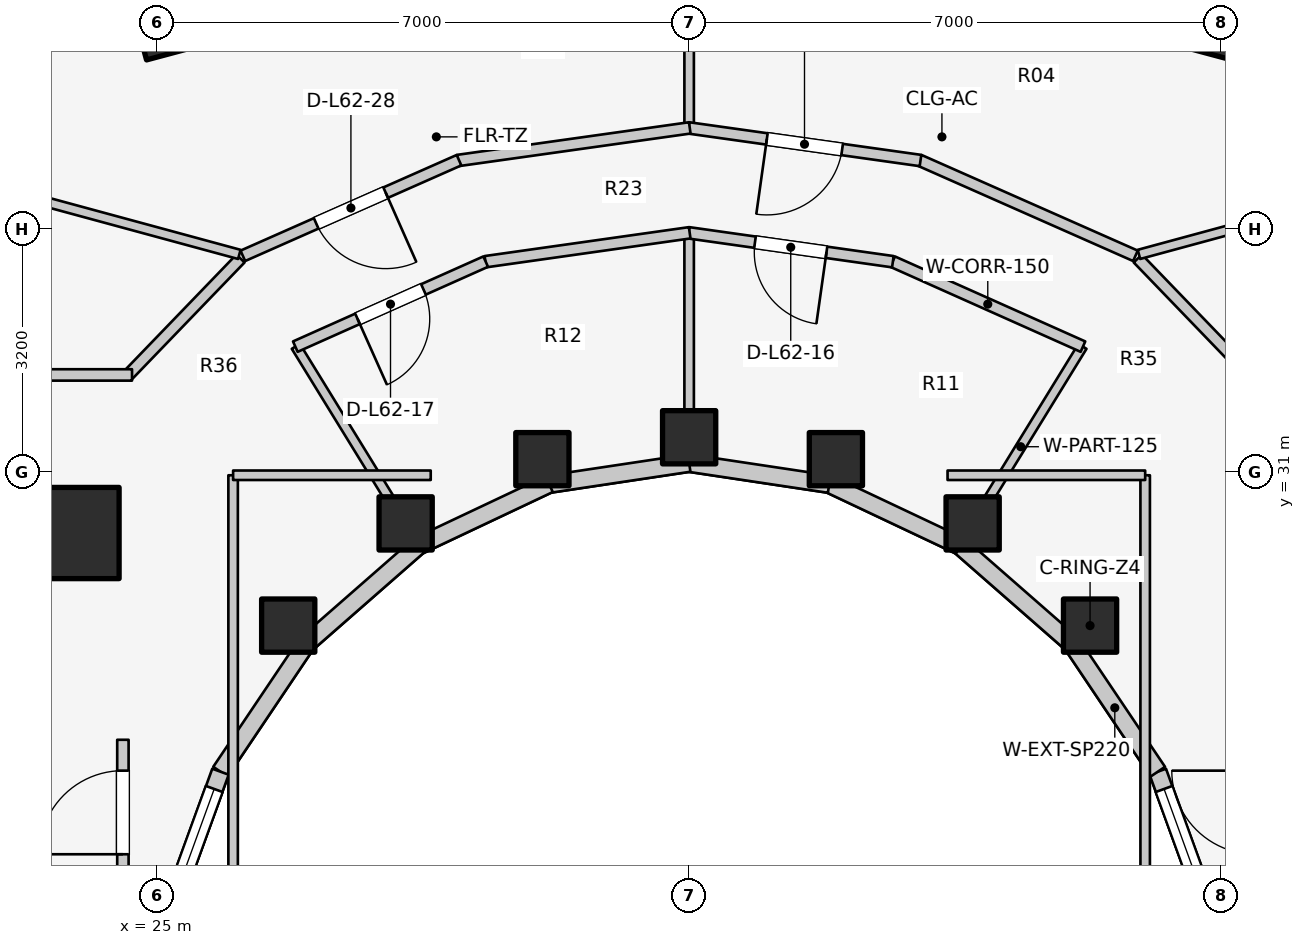
"""IFC4 building model, lengths in metres.
Left out: names, types, materials, properties, quantities, classifications, styles, units other than length and angle.
Written with IfcOpenShell. Run it as: python <this file> out.ifc"""

import sys

from ifc_helpers import new_model, si_unit, direction, frame, frame_2d, origin, origin_2d, place, context, subcontext, project, spatial, rectangle, extrude, element, fill, save


model = new_model("IFC4")
c1 = context("Model", 3, precision=1e-05, world=origin(), true_north=direction((0.0, 1.0)))
c2 = subcontext(c1, "Body", "Model", "MODEL_VIEW")
j1 = project(units=[si_unit("LENGTHUNIT", "METRE"), si_unit("PLANEANGLEUNIT", "RADIAN")], contexts=[c1])
p1 = place(None, origin())
s1 = spatial("IfcSite", under=j1, at=p1, CompositionType="ELEMENT")
p2 = place(p1, origin())
s2 = spatial("IfcBuilding", under=s1, at=p2, CompositionType="ELEMENT")
p3 = place(p2, frame((0.0, 0.0, 204.7)))
s3 = spatial("IfcBuildingStorey", under=s2, at=p3, CompositionType="ELEMENT", Elevation=204.7)
p4 = place(p3, frame((19.65, 30.35, 0.0), z_axis=(0.0, 0.0, 1.0), x_axis=(1.0, 0.0, 0.0)))
e1 = element("IfcWall", 1, at=p4, inside=s3, PredefinedType="SHEAR", context=c2, shape_type="SweptSolid", body=[
    extrude(rectangle(XDim=4.5, YDim=0.55, at=frame_2d((2.25, 0.0))), origin(), (0.0, 0.0, 1.0), 3.1),
])
p5 = place(p3, frame((23.9, 30.2, 0.0), z_axis=(0.0, 0.0, 1.0), x_axis=(1.0, 0.0, 0.0)))
e2 = element("IfcColumn", 2, at=p5, inside=s3, PredefinedType="COLUMN", context=c2, shape_type="SweptSolid", body=[
    extrude(rectangle(XDim=1.2, YDim=1.2, at=origin_2d()), origin(), (0.0, 0.0, 1.0), 3.1),
])
for number, where, z_axis, x_axis in (
    (3, (37.275, 28.982, 0.0), (0.0, 0.0, 1.0), (1.0, 0.0, 0.0)),
    (4, (35.73, 30.327, 0.0), (0.0, 0.0, 1.0), (1.0, 0.0, 0.0)),
    (5, (33.931, 31.172, 0.0), (0.0, 0.0, 1.0), (1.0, 0.0, 0.0)),
):
    element("IfcColumn", number, at=place(p3, frame(where, z_axis=z_axis, x_axis=x_axis)), inside=s3, PredefinedType="COLUMN", context=c2, shape_type="SweptSolid", body=[
        extrude(rectangle(XDim=0.7, YDim=0.7, at=origin_2d()), origin(), (0.0, 0.0, 1.0), 3.1),
    ])
p6 = place(p3, frame((38.856, 36.914, 0.0), z_axis=(0.0, 0.0, 1.0), x_axis=(0.258819045103, 0.965925826289, 0.0)))
e6 = element("IfcColumn", 6, at=p6, inside=s3, PredefinedType="COLUMN", context=c2, shape_type="SweptSolid", body=[
    extrude(rectangle(XDim=0.8, YDim=0.8, at=origin_2d()), origin(), (0.0, 0.0, 1.0), 3.1),
])
for number, where, z_axis, x_axis in (
    (7, (32.0, 31.46, 0.0), (0.0, 0.0, 1.0), (1.0, 0.0, 0.0)),
    (8, (30.069, 31.172, 0.0), (0.0, 0.0, 1.0), (1.0, 0.0, 0.0)),
):
    element("IfcColumn", number, at=place(p3, frame(where, z_axis=z_axis, x_axis=x_axis)), inside=s3, PredefinedType="COLUMN", context=c2, shape_type="SweptSolid", body=[
        extrude(rectangle(XDim=0.7, YDim=0.7, at=origin_2d()), origin(), (0.0, 0.0, 1.0), 3.1),
    ])
p7 = place(p3, frame((25.144, 36.914, 0.0), z_axis=(0.0, 0.0, 1.0), x_axis=(-0.258819045103, 0.965925826289, 0.0)))
e9 = element("IfcColumn", 9, at=p7, inside=s3, PredefinedType="COLUMN", context=c2, shape_type="SweptSolid", body=[
    extrude(rectangle(XDim=0.8, YDim=0.8, at=origin_2d()), origin(), (0.0, 0.0, 1.0), 3.1),
])
for number, where, z_axis, x_axis in (
    (10, (28.27, 30.327, 0.0), (0.0, 0.0, 1.0), (1.0, 0.0, 0.0)),
    (11, (26.725, 28.982, 0.0), (0.0, 0.0, 1.0), (1.0, 0.0, 0.0)),
):
    element("IfcColumn", number, at=place(p3, frame(where, z_axis=z_axis, x_axis=x_axis)), inside=s3, PredefinedType="COLUMN", context=c2, shape_type="SweptSolid", body=[
        extrude(rectangle(XDim=0.7, YDim=0.7, at=origin_2d()), origin(), (0.0, 0.0, 1.0), 3.1),
    ])
p8 = place(p3, frame((38.877, 25.102, 0.0), z_axis=(0.0, 0.0, 1.0), x_axis=(-0.341423187295, 0.93990968033, 0.0)))
e12 = element("IfcWall", 12, at=p8, inside=s3, PredefinedType="STANDARD", context=c2, shape_type="SweptSolid", body=[
    extrude(rectangle(XDim=2.084, YDim=0.23, at=frame_2d((1.042, 0.0))), origin(), (0.0, 0.0, 1.0), 2.84),
])
p9 = place(p8, frame((0.242, 0.0, 0.85)))
e13 = element("IfcOpeningElement", 13, at=p9, cuts=e12, PredefinedType="OPENING", context=c2, shape_type="SweptSolid", body=[
    extrude(rectangle(XDim=1.6, YDim=1.65, at=frame_2d((0.8, 0.825))), frame((0.0, 0.125, 0.0), z_axis=(0.0, -1.0, 0.0), x_axis=(1.0, 0.0, 0.0)), (0.0, 0.0, 1.0), 0.25),
])
p10 = place(p3, frame((38.166, 27.06, 0.0), z_axis=(0.0, 0.0, 1.0), x_axis=(-0.558197800898, 0.829707909492, 0.0)))
e14 = element("IfcWall", 14, at=p10, inside=s3, PredefinedType="STANDARD", context=c2, shape_type="SweptSolid", body=[
    extrude(rectangle(XDim=2.027, YDim=0.23, at=frame_2d((1.013, 0.0))), origin(), (0.0, 0.0, 1.0), 2.16),
])
p11 = place(p3, frame((37.035, 28.742, 0.0), z_axis=(0.0, 0.0, 1.0), x_axis=(-0.752576694707, 0.658504607869, 0.0)))
e15 = element("IfcWall", 15, at=p11, inside=s3, PredefinedType="STANDARD", context=c2, shape_type="SweptSolid", body=[
    extrude(rectangle(XDim=1.959, YDim=0.23, at=frame_2d((0.98, 0.0))), origin(), (0.0, 0.0, 1.0), 2.16),
])
p12 = place(p3, frame((35.56, 30.032, 0.0), z_axis=(0.0, 0.0, 1.0), x_axis=(-0.904179699603, 0.427152280606, 0.0)))
e16 = element("IfcWall", 16, at=p12, inside=s3, PredefinedType="STANDARD", context=c2, shape_type="SweptSolid", body=[
    extrude(rectangle(XDim=1.899, YDim=0.23, at=frame_2d((0.95, 0.0))), origin(), (0.0, 0.0, 1.0), 2.16),
])
for number, where, z_axis, x_axis in (
    (17, (33.843, 30.843, 0.0), (0.0, 0.0, 1.0), (-0.989, 0.149, 0.0)),
    (18, (32.0, 31.12, 0.0), (0.0, 0.0, 1.0), (-0.989, -0.149, 0.0)),
):
    element("IfcWall", number, at=place(p3, frame(where, z_axis=z_axis, x_axis=x_axis)), inside=s3, PredefinedType="STANDARD", context=c2, shape_type="SweptSolid", body=[
        extrude(rectangle(XDim=1.864, YDim=0.23, at=frame_2d((0.932, 0.0))), origin(), (0.0, 0.0, 1.0), 2.16),
    ])
p13 = place(p3, frame((30.157, 30.843, 0.0), z_axis=(0.0, 0.0, 1.0), x_axis=(-0.904179699603, -0.427152280606, 0.0)))
e19 = element("IfcWall", 19, at=p13, inside=s3, PredefinedType="STANDARD", context=c2, shape_type="SweptSolid", body=[
    extrude(rectangle(XDim=1.899, YDim=0.23, at=frame_2d((0.95, 0.0))), origin(), (0.0, 0.0, 1.0), 2.16),
])
p14 = place(p3, frame((28.44, 30.032, 0.0), z_axis=(0.0, 0.0, 1.0), x_axis=(-0.752576694707, -0.658504607869, 0.0)))
e20 = element("IfcWall", 20, at=p14, inside=s3, PredefinedType="STANDARD", context=c2, shape_type="SweptSolid", body=[
    extrude(rectangle(XDim=1.959, YDim=0.23, at=frame_2d((0.98, 0.0))), origin(), (0.0, 0.0, 1.0), 2.16),
])
p15 = place(p3, frame((26.965, 28.742, 0.0), z_axis=(0.0, 0.0, 1.0), x_axis=(-0.558197800898, -0.829707909492, 0.0)))
e21 = element("IfcWall", 21, at=p15, inside=s3, PredefinedType="STANDARD", context=c2, shape_type="SweptSolid", body=[
    extrude(rectangle(XDim=2.027, YDim=0.23, at=frame_2d((1.013, 0.0))), origin(), (0.0, 0.0, 1.0), 2.16),
])
p16 = place(p3, frame((25.834, 27.06, 0.0), z_axis=(0.0, 0.0, 1.0), x_axis=(-0.341423187295, -0.93990968033, 0.0)))
e22 = element("IfcWall", 22, at=p16, inside=s3, PredefinedType="STANDARD", context=c2, shape_type="SweptSolid", body=[
    extrude(rectangle(XDim=2.084, YDim=0.23, at=frame_2d((1.042, 0.0))), origin(), (0.0, 0.0, 1.0), 2.84),
])
p17 = place(p16, frame((0.242, 0.0, 0.85)))
e23 = element("IfcOpeningElement", 23, at=p17, cuts=e22, PredefinedType="OPENING", context=c2, shape_type="SweptSolid", body=[
    extrude(rectangle(XDim=1.6, YDim=1.65, at=frame_2d((0.8, 0.825))), frame((0.0, 0.125, 0.0), z_axis=(0.0, -1.0, 0.0), x_axis=(1.0, 0.0, 0.0)), (0.0, 0.0, 1.0), 0.25),
])
p18 = place(p3, frame((43.87, 36.177, 0.0), z_axis=(0.0, 0.0, 1.0), x_axis=(-0.965213026382, 0.261464746576, 0.0)))
e24 = element("IfcWall", 24, at=p18, inside=s3, PredefinedType="STANDARD", context=c2, shape_type="SweptSolid", body=[
    extrude(rectangle(XDim=5.001, YDim=0.26, at=frame_2d((2.5, 0.0))), origin(), (0.0, 0.0, 1.0), 2.88),
])
p19 = place(p18, frame((1.9, 0.0, 0.0)))
e25 = element("IfcOpeningElement", 25, at=p19, cuts=e24, PredefinedType="OPENING", context=c2, shape_type="SweptSolid", body=[
    extrude(rectangle(XDim=1.2, YDim=2.2, at=frame_2d((0.6, 1.1))), frame((0.0, 0.14, 0.0), z_axis=(0.0, -1.0, 0.0), x_axis=(1.0, 0.0, 0.0)), (0.0, 0.0, 1.0), 0.28),
])
p20 = place(p3, frame((24.957, 37.485, 0.0), z_axis=(0.0, 0.0, 1.0), x_axis=(-0.965213026382, -0.261464746576, 0.0)))
e26 = element("IfcWall", 26, at=p20, inside=s3, PredefinedType="STANDARD", context=c2, shape_type="SweptSolid", body=[
    extrude(rectangle(XDim=5.001, YDim=0.26, at=frame_2d((2.5, 0.0))), origin(), (0.0, 0.0, 1.0), 2.88),
])
p21 = place(p20, frame((1.9, 0.0, 0.0)))
e27 = element("IfcOpeningElement", 27, at=p21, cuts=e26, PredefinedType="OPENING", context=c2, shape_type="SweptSolid", body=[
    extrude(rectangle(XDim=1.2, YDim=2.2, at=frame_2d((0.6, 1.1))), frame((0.0, 0.14, 0.0), z_axis=(0.0, -1.0, 0.0), x_axis=(1.0, 0.0, 0.0)), (0.0, 0.0, 1.0), 0.28),
])
p22 = place(p3, frame((24.55, 24.08, 0.0), z_axis=(0.0, 0.0, 1.0), x_axis=(0.0, 1.0, 0.0)))
e28 = element("IfcWall", 28, at=p22, inside=s3, PredefinedType="PARTITIONING", context=c2, shape_type="SweptSolid", body=[
    extrude(rectangle(XDim=3.4, YDim=0.15, at=frame_2d((1.7, 0.0))), origin(), (0.0, 0.0, 1.0), 2.855),
])
p23 = place(p22, frame((1.894, 0.0, 0.0)))
e29 = element("IfcOpeningElement", 29, at=p23, cuts=e28, PredefinedType="OPENING", context=c2, shape_type="SweptSolid", body=[
    extrude(rectangle(XDim=1.1, YDim=2.1, at=frame_2d((0.55, 1.05))), frame((0.0, 0.085, 0.0), z_axis=(0.0, -1.0, 0.0), x_axis=(1.0, 0.0, 0.0)), (0.0, 0.0, 1.0), 0.17),
])
p24 = place(p3, frame((35.55, 30.015, 0.0), z_axis=(0.0, 0.0, 1.0), x_axis=(0.523992004803, 0.851723182086, 0.0)))
e30 = element("IfcWall", 30, at=p24, inside=s3, PredefinedType="PARTITIONING", context=c2, shape_type="SweptSolid", body=[
    extrude(rectangle(XDim=3.101, YDim=0.125, at=frame_2d((1.551, 0.0))), origin(), (0.0, 0.0, 1.0), 2.376),
])
p25 = place(p3, frame((32.0, 31.1, 0.0), z_axis=(0.0, 0.0, 1.0), x_axis=(0.0, 1.0, 0.0)))
e31 = element("IfcWall", 31, at=p25, inside=s3, PredefinedType="PARTITIONING", context=c2, shape_type="SweptSolid", body=[
    extrude(rectangle(XDim=3.05, YDim=0.125, at=frame_2d((1.525, 0.0))), origin(), (0.0, 0.0, 1.0), 2.376),
])
p26 = place(p3, frame((28.45, 30.015, 0.0), z_axis=(0.0, 0.0, 1.0), x_axis=(-0.523992004803, 0.851723182086, 0.0)))
e32 = element("IfcWall", 32, at=p26, inside=s3, PredefinedType="PARTITIONING", context=c2, shape_type="SweptSolid", body=[
    extrude(rectangle(XDim=3.101, YDim=0.125, at=frame_2d((1.551, 0.0))), origin(), (0.0, 0.0, 1.0), 2.376),
])
p27 = place(p3, frame((37.181, 32.652, 0.0), z_axis=(0.0, 0.0, 1.0), x_axis=(-0.913120130558, 0.407690602257, 0.0)))
e33 = element("IfcWall", 33, at=p27, inside=s3, PredefinedType="PARTITIONING", context=c2, shape_type="SweptSolid", body=[
    extrude(rectangle(XDim=2.743, YDim=0.15, at=frame_2d((1.371, 0.0))), origin(), (0.0, 0.0, 1.0), 2.376),
])
p28 = place(p3, frame((34.68, 33.77, 0.0), z_axis=(0.0, 0.0, 1.0), x_axis=(-0.990132151456, 0.140136799779, 0.0)))
e34 = element("IfcWall", 34, at=p28, inside=s3, PredefinedType="PARTITIONING", context=c2, shape_type="SweptSolid", body=[
    extrude(rectangle(XDim=2.714, YDim=0.15, at=frame_2d((1.357, 0.0))), origin(), (0.0, 0.0, 1.0), 2.376),
])
p29 = place(p28, frame((0.882, 0.0, 0.0)))
e35 = element("IfcOpeningElement", 35, at=p29, cuts=e34, PredefinedType="OPENING", context=c2, shape_type="SweptSolid", body=[
    extrude(rectangle(XDim=0.95, YDim=2.1, at=frame_2d((0.475, 1.05))), frame((0.0, 0.085, 0.0), z_axis=(0.0, -1.0, 0.0), x_axis=(1.0, 0.0, 0.0)), (0.0, 0.0, 1.0), 0.17),
])
p30 = place(p3, frame((32.007, 34.15, 0.0), z_axis=(0.0, 0.0, 1.0), x_axis=(-0.990132151456, -0.140136799779, 0.0)))
e36 = element("IfcWall", 36, at=p30, inside=s3, PredefinedType="PARTITIONING", context=c2, shape_type="SweptSolid", body=[
    extrude(rectangle(XDim=2.714, YDim=0.15, at=frame_2d((1.357, 0.0))), origin(), (0.0, 0.0, 1.0), 2.376),
])
p31 = place(p3, frame((29.323, 33.771, 0.0), z_axis=(0.0, 0.0, 1.0), x_axis=(-0.913120130558, -0.407690602257, 0.0)))
e37 = element("IfcWall", 37, at=p31, inside=s3, PredefinedType="PARTITIONING", context=c2, shape_type="SweptSolid", body=[
    extrude(rectangle(XDim=2.743, YDim=0.15, at=frame_2d((1.371, 0.0))), origin(), (0.0, 0.0, 1.0), 2.376),
])
p32 = place(p31, frame((0.896, 0.0, 0.0)))
e38 = element("IfcOpeningElement", 38, at=p32, cuts=e37, PredefinedType="OPENING", context=c2, shape_type="SweptSolid", body=[
    extrude(rectangle(XDim=0.95, YDim=2.1, at=frame_2d((0.475, 1.05))), frame((0.0, 0.085, 0.0), z_axis=(0.0, -1.0, 0.0), x_axis=(1.0, 0.0, 0.0)), (0.0, 0.0, 1.0), 0.17),
])
p33 = place(p3, frame((26.0, 25.8, 0.0), z_axis=(0.0, 0.0, 1.0), x_axis=(0.0, 1.0, 0.0)))
e39 = element("IfcWall", 39, at=p33, inside=s3, PredefinedType="PARTITIONING", context=c2, shape_type="SweptSolid", body=[
    extrude(rectangle(XDim=5.16, YDim=0.125, at=frame_2d((2.58, 0.0))), origin(), (0.0, 0.0, 1.0), 2.232),
])
p34 = place(p3, frame((26.0, 30.96, 0.0), z_axis=(0.0, 0.0, 1.0), x_axis=(1.0, 0.0, 0.0)))
e40 = element("IfcWall", 40, at=p34, inside=s3, PredefinedType="PARTITIONING", context=c2, shape_type="SweptSolid", body=[
    extrude(rectangle(XDim=2.6, YDim=0.125, at=frame_2d((1.3, 0.0))), origin(), (0.0, 0.0, 1.0), 2.376),
])
p35 = place(p3, frame((38.0, 25.8, 0.0), z_axis=(0.0, 0.0, 1.0), x_axis=(0.0, 1.0, 0.0)))
e41 = element("IfcWall", 41, at=p35, inside=s3, PredefinedType="PARTITIONING", context=c2, shape_type="SweptSolid", body=[
    extrude(rectangle(XDim=5.16, YDim=0.125, at=frame_2d((2.58, 0.0))), origin(), (0.0, 0.0, 1.0), 2.232),
])
p36 = place(p3, frame((35.4, 30.96, 0.0), z_axis=(0.0, 0.0, 1.0), x_axis=(1.0, 0.0, 0.0)))
e42 = element("IfcWall", 42, at=p36, inside=s3, PredefinedType="PARTITIONING", context=c2, shape_type="SweptSolid", body=[
    extrude(rectangle(XDim=2.6, YDim=0.125, at=frame_2d((1.3, 0.0))), origin(), (0.0, 0.0, 1.0), 2.376),
])
for number, where, z_axis, x_axis in (
    (43, (37.903, 33.812, 0.0), (0.0, 0.0, 1.0), (0.694, -0.72, 0.0)),
    (44, (26.097, 33.812, 0.0), (0.0, 0.0, 1.0), (-0.694, -0.72, 0.0)),
):
    element("IfcWall", number, at=place(p3, frame(where, z_axis=z_axis, x_axis=x_axis)), inside=s3, PredefinedType="PARTITIONING", context=c2, shape_type="SweptSolid", body=[
        extrude(rectangle(XDim=2.158, YDim=0.15, at=frame_2d((1.079, 0.0))), origin(), (0.0, 0.0, 1.0), 2.376),
    ])
p37 = place(p3, frame((17.15, 32.28, 0.0), z_axis=(0.0, 0.0, 1.0), x_axis=(1.0, 0.0, 0.0)))
e45 = element("IfcWall", 45, at=p37, inside=s3, PredefinedType="PARTITIONING", context=c2, shape_type="SweptSolid", body=[
    extrude(rectangle(XDim=7.52, YDim=0.15, at=frame_2d((3.76, 0.0))), origin(), (0.0, 0.0, 1.0), 2.376),
])
p38 = place(p37, frame((1.3, 0.0, 0.0)))
e46 = element("IfcOpeningElement", 46, at=p38, cuts=e45, PredefinedType="OPENING", context=c2, shape_type="SweptSolid", body=[
    extrude(rectangle(XDim=0.9, YDim=2.1, at=frame_2d((0.45, 1.05))), frame((0.0, 0.085, 0.0), z_axis=(0.0, -1.0, 0.0), x_axis=(1.0, 0.0, 0.0)), (0.0, 0.0, 1.0), 0.17),
])
p39 = place(p3, frame((37.918, 33.866, 0.0), z_axis=(0.0, 0.0, 1.0), x_axis=(0.965109390289, 0.261847025523, 0.0)))
e47 = element("IfcWall", 47, at=p39, inside=s3, PredefinedType="PARTITIONING", context=c2, shape_type="SweptSolid", body=[
    extrude(rectangle(XDim=5.644, YDim=0.125, at=frame_2d((2.822, 0.0))), origin(), (0.0, 0.0, 1.0), 2.376),
])
p40 = place(p3, frame((32.0, 35.585, 0.0), z_axis=(0.0, 0.0, 1.0), x_axis=(0.0, 1.0, 0.0)))
e48 = element("IfcWall", 48, at=p40, inside=s3, PredefinedType="PARTITIONING", context=c2, shape_type="SweptSolid", body=[
    extrude(rectangle(XDim=1.315, YDim=0.125, at=frame_2d((0.657, 0.0))), origin(), (0.0, 0.0, 1.0), 2.376),
])
p41 = place(p3, frame((26.082, 33.866, 0.0), z_axis=(0.0, 0.0, 1.0), x_axis=(-0.965109390289, 0.261847025523, 0.0)))
e49 = element("IfcWall", 49, at=p41, inside=s3, PredefinedType="PARTITIONING", context=c2, shape_type="SweptSolid", body=[
    extrude(rectangle(XDim=5.644, YDim=0.125, at=frame_2d((2.822, 0.0))), origin(), (0.0, 0.0, 1.0), 2.376),
])
p42 = place(p3, frame((37.872, 33.847, 0.0), z_axis=(0.0, 0.0, 1.0), x_axis=(-0.914490094652, 0.40460828808, 0.0)))
e50 = element("IfcWall", 50, at=p42, inside=s3, PredefinedType="PARTITIONING", context=c2, shape_type="SweptSolid", body=[
    extrude(rectangle(XDim=3.11, YDim=0.15, at=frame_2d((1.555, 0.0))), origin(), (0.0, 0.0, 1.0), 2.376),
])
p43 = place(p3, frame((35.044, 35.101, 0.0), z_axis=(0.0, 0.0, 1.0), x_axis=(-0.990257602807, 0.139247549651, 0.0)))
e51 = element("IfcWall", 51, at=p43, inside=s3, PredefinedType="PARTITIONING", context=c2, shape_type="SweptSolid", body=[
    extrude(rectangle(XDim=3.082, YDim=0.15, at=frame_2d((1.541, 0.0))), origin(), (0.0, 0.0, 1.0), 2.376),
])
p44 = place(p43, frame((1.041, 0.0, 0.0)))
e52 = element("IfcOpeningElement", 52, at=p44, cuts=e51, PredefinedType="OPENING", context=c2, shape_type="SweptSolid", body=[
    extrude(rectangle(XDim=1.0, YDim=2.1, at=frame_2d((0.5, 1.05))), frame((0.0, 0.085, 0.0), z_axis=(0.0, -1.0, 0.0), x_axis=(1.0, 0.0, 0.0)), (0.0, 0.0, 1.0), 0.17),
])
p45 = place(p3, frame((32.008, 35.53, 0.0), z_axis=(0.0, 0.0, 1.0), x_axis=(-0.990257602807, -0.139247549651, 0.0)))
e53 = element("IfcWall", 53, at=p45, inside=s3, PredefinedType="PARTITIONING", context=c2, shape_type="SweptSolid", body=[
    extrude(rectangle(XDim=3.082, YDim=0.15, at=frame_2d((1.541, 0.0))), origin(), (0.0, 0.0, 1.0), 2.376),
])
p46 = place(p3, frame((28.972, 35.105, 0.0), z_axis=(0.0, 0.0, 1.0), x_axis=(-0.914490094652, -0.40460828808, 0.0)))
e54 = element("IfcWall", 54, at=p46, inside=s3, PredefinedType="PARTITIONING", context=c2, shape_type="SweptSolid", body=[
    extrude(rectangle(XDim=3.11, YDim=0.15, at=frame_2d((1.555, 0.0))), origin(), (0.0, 0.0, 1.0), 2.376),
])
p47 = place(p46, frame((1.055, 0.0, 0.0)))
e55 = element("IfcOpeningElement", 55, at=p47, cuts=e54, PredefinedType="OPENING", context=c2, shape_type="SweptSolid", body=[
    extrude(rectangle(XDim=1.0, YDim=2.1, at=frame_2d((0.5, 1.05))), frame((0.0, 0.085, 0.0), z_axis=(0.0, -1.0, 0.0), x_axis=(1.0, 0.0, 0.0)), (0.0, 0.0, 1.0), 0.17),
])
p48 = place(p9, origin())
e56 = element("IfcWindow", 56, at=p48, inside=s3, PartitioningType="SINGLE_PANEL", PredefinedType="WINDOW", context=c2, shape_type="SweptSolid", body=[
    extrude(rectangle(XDim=1.6, YDim=1.65, at=frame_2d((0.8, 0.825))), frame((0.0, 0.03, 0.0), z_axis=(0.0, -1.0, 0.0), x_axis=(1.0, 0.0, 0.0)), (0.0, 0.0, 1.0), 0.06),
])
fill(e13, e56)
p49 = place(p17, origin())
e57 = element("IfcWindow", 57, at=p49, inside=s3, PartitioningType="SINGLE_PANEL", PredefinedType="WINDOW", context=c2, shape_type="SweptSolid", body=[
    extrude(rectangle(XDim=1.6, YDim=1.65, at=frame_2d((0.8, 0.825))), frame((0.0, 0.03, 0.0), z_axis=(0.0, -1.0, 0.0), x_axis=(1.0, 0.0, 0.0)), (0.0, 0.0, 1.0), 0.06),
])
fill(e23, e57)
p50 = place(p23, origin())
e58 = element("IfcDoor", 58, at=p50, inside=s3, OperationType="SINGLE_SWING_LEFT", PredefinedType="DOOR", context=c2, shape_type="SweptSolid", body=[
    extrude(rectangle(XDim=1.1, YDim=2.1, at=frame_2d((0.55, 1.05))), frame((0.0, 0.025, 0.0), z_axis=(0.0, -1.0, 0.0), x_axis=(1.0, 0.0, 0.0)), (0.0, 0.0, 1.0), 0.05),
])
fill(e29, e58)
p51 = place(p29, origin())
e59 = element("IfcDoor", 59, at=p51, inside=s3, OperationType="SINGLE_SWING_LEFT", PredefinedType="DOOR", context=c2, shape_type="SweptSolid", body=[
    extrude(rectangle(XDim=0.95, YDim=2.1, at=frame_2d((0.475, 1.05))), frame((0.0, 0.025, 0.0), z_axis=(0.0, -1.0, 0.0), x_axis=(1.0, 0.0, 0.0)), (0.0, 0.0, 1.0), 0.05),
])
fill(e35, e59)
p52 = place(p32, origin())
e60 = element("IfcDoor", 60, at=p52, inside=s3, OperationType="SINGLE_SWING_RIGHT", PredefinedType="DOOR", context=c2, shape_type="SweptSolid", body=[
    extrude(rectangle(XDim=0.95, YDim=2.1, at=frame_2d((0.475, 1.05))), frame((0.0, 0.025, 0.0), z_axis=(0.0, -1.0, 0.0), x_axis=(1.0, 0.0, 0.0)), (0.0, 0.0, 1.0), 0.05),
])
fill(e38, e60)
p53 = place(p44, origin())
e61 = element("IfcDoor", 61, at=p53, inside=s3, OperationType="SINGLE_SWING_RIGHT", PredefinedType="DOOR", context=c2, shape_type="SweptSolid", body=[
    extrude(rectangle(XDim=1.0, YDim=2.1, at=frame_2d((0.5, 1.05))), frame((0.0, 0.025, 0.0), z_axis=(0.0, -1.0, 0.0), x_axis=(1.0, 0.0, 0.0)), (0.0, 0.0, 1.0), 0.05),
])
fill(e52, e61)
p54 = place(p47, origin())
e62 = element("IfcDoor", 62, at=p54, inside=s3, OperationType="SINGLE_SWING_LEFT", PredefinedType="DOOR", context=c2, shape_type="SweptSolid", body=[
    extrude(rectangle(XDim=1.0, YDim=2.1, at=frame_2d((0.5, 1.05))), frame((0.0, 0.025, 0.0), z_axis=(0.0, -1.0, 0.0), x_axis=(1.0, 0.0, 0.0)), (0.0, 0.0, 1.0), 0.05),
])
fill(e55, e62)
save(model, sys.argv[1])
